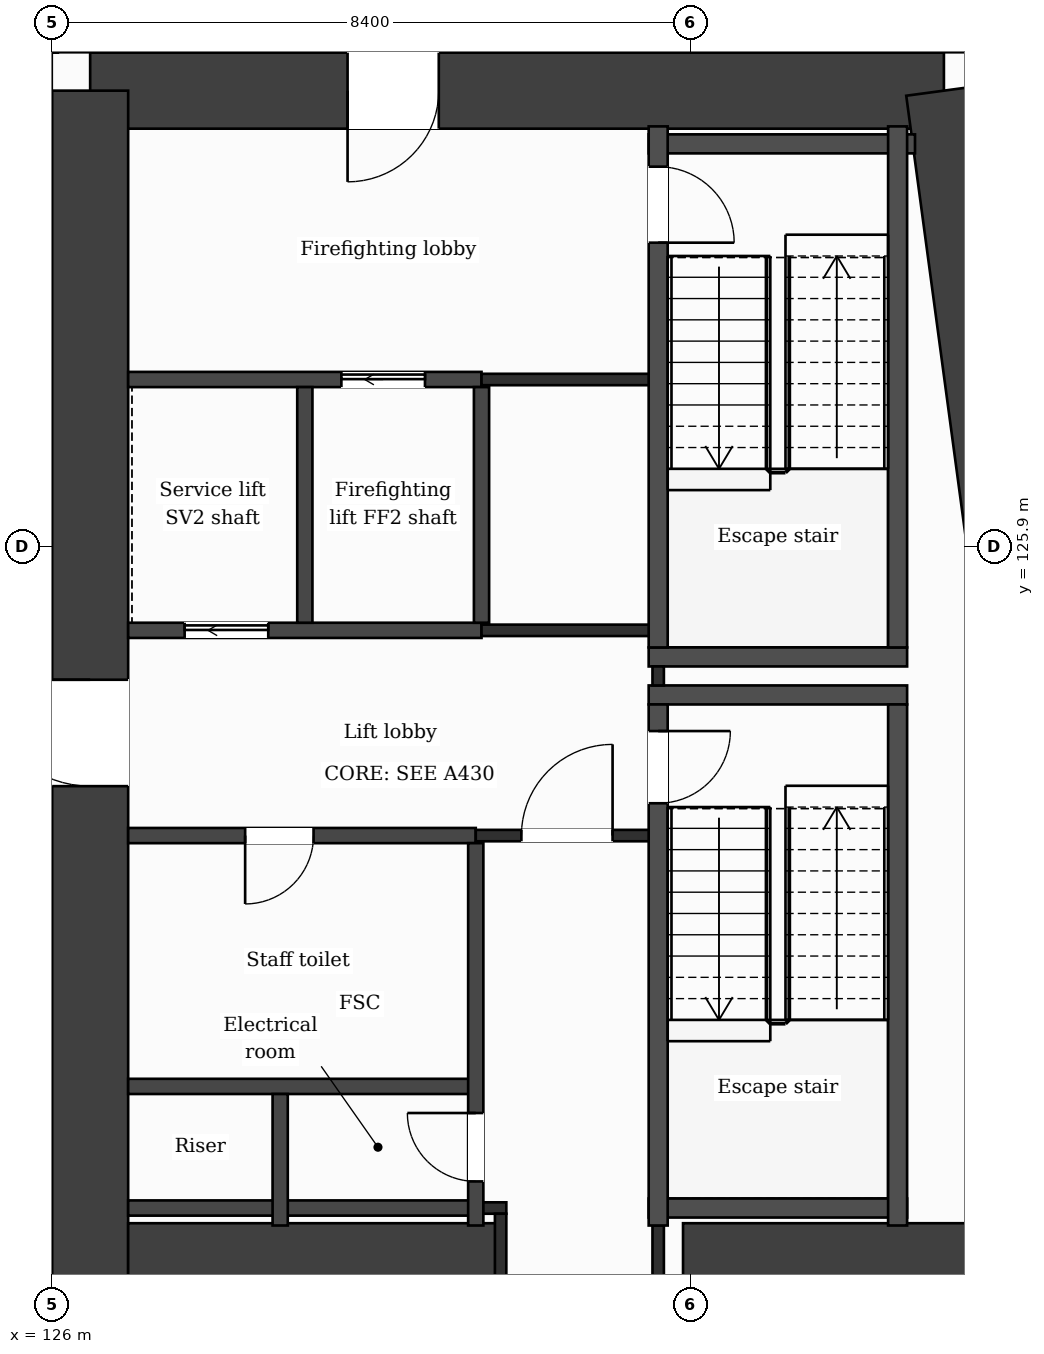
"""IFC4 building model, lengths in metres.
Left out: names, types, materials, properties, quantities, classifications, styles, units other than length and angle.
Written with IfcOpenShell. Run it as: python <this file> out.ifc"""

import sys

from ifc_helpers import new_model, si_unit, direction, frame, frame_2d, origin, place, context, subcontext, project, spatial, rectangle, extrude, element, fill, save


model = new_model("IFC4")
c1 = context("Model", 3, precision=1e-05, world=origin(), true_north=direction((0.0, 1.0)))
c2 = subcontext(c1, "Body", "Model", "MODEL_VIEW")
j1 = project(units=[si_unit("LENGTHUNIT", "METRE"), si_unit("PLANEANGLEUNIT", "RADIAN")], contexts=[c1])
p1 = place(None, origin())
s1 = spatial("IfcSite", under=j1, at=p1, CompositionType="ELEMENT")
p2 = place(p1, origin())
s2 = spatial("IfcBuilding", under=s1, at=p2, CompositionType="ELEMENT")
p3 = place(p2, frame((0.0, 0.0, 124.3)))
s3 = spatial("IfcBuildingStorey", under=s2, at=p3, CompositionType="ELEMENT", Elevation=124.3)
p4 = place(p3, frame((126.5, 131.9, 0.0), z_axis=(0.0, 0.0, 1.0), x_axis=(1.0, 0.0, 0.0)))
e1 = element("IfcWall", 1, at=p4, inside=s3, PredefinedType="SHEAR", context=c2, shape_type="SweptSolid", body=[
    extrude(rectangle(XDim=11.232, YDim=1.0, at=frame_2d((5.616, 0.0))), origin(), (0.0, 0.0, 1.0), 3.7),
])
p5 = place(p4, frame((3.386, 0.0, 0.0)))
e2 = element("IfcOpeningElement", 2, at=p5, cuts=e1, PredefinedType="OPENING", context=c2, shape_type="SweptSolid", body=[
    extrude(rectangle(XDim=1.2, YDim=2.1, at=frame_2d((0.6, 1.05))), frame((0.0, 0.51, 0.0), z_axis=(0.0, -1.0, 0.0), x_axis=(1.0, 0.0, 0.0)), (0.0, 0.0, 1.0), 1.02),
])
p6 = place(p3, frame((137.732, 131.9, 0.0), z_axis=(0.0, 0.0, 1.0), x_axis=(0.133411141623, -0.991060778808, 0.0)))
e3 = element("IfcWall", 3, at=p6, inside=s3, PredefinedType="SHEAR", context=c2, shape_type="SweptSolid", body=[
    extrude(rectangle(XDim=21.189, YDim=1.0, at=frame_2d((10.595, 0.0))), origin(), (0.0, 0.0, 1.0), 3.7),
])
p7 = place(p3, frame((126.5, 110.9, 0.0), z_axis=(0.0, 0.0, 1.0), x_axis=(0.0, 1.0, 0.0)))
e4 = element("IfcWall", 4, at=p7, inside=s3, PredefinedType="SHEAR", context=c2, shape_type="SweptSolid", body=[
    extrude(rectangle(XDim=21.0, YDim=1.0, at=frame_2d((10.5, 0.0))), origin(), (0.0, 0.0, 1.0), 3.7),
])
p8 = place(p7, frame((11.85, 0.0, 0.0)))
e5 = element("IfcOpeningElement", 5, at=p8, cuts=e4, PredefinedType="OPENING", context=c2, shape_type="SweptSolid", body=[
    extrude(rectangle(XDim=1.4, YDim=2.1, at=frame_2d((0.7, 1.05))), frame((0.0, 0.51, 0.0), z_axis=(0.0, -1.0, 0.0), x_axis=(1.0, 0.0, 0.0)), (0.0, 0.0, 1.0), 1.02),
])
p9 = place(p3, frame((127.0, 116.5, 0.0), z_axis=(0.0, 0.0, 1.0), x_axis=(1.0, 0.0, 0.0)))
e6 = element("IfcWall", 6, at=p9, inside=s3, PredefinedType="SHEAR", context=c2, shape_type="SweptSolid", body=[
    extrude(rectangle(XDim=4.9, YDim=1.0, at=frame_2d((2.45, 0.0))), origin(), (0.0, 0.0, 1.0), 3.7),
])
p10 = place(p3, frame((134.3, 116.5, 0.0), z_axis=(0.0, 0.0, 1.0), x_axis=(1.0, 0.0, 0.0)))
e7 = element("IfcWall", 7, at=p10, inside=s3, PredefinedType="SHEAR", context=c2, shape_type="SweptSolid", body=[
    extrude(rectangle(XDim=5.077, YDim=1.0, at=frame_2d((2.539, 0.0))), origin(), (0.0, 0.0, 1.0), 3.7),
])
p11 = place(p3, frame((136.504, 132.4, 0.0), z_axis=(0.0, 0.0, 1.0), x_axis=(-0.133399697462, 0.99106231929, 0.0)))
e8 = element("IfcWall", 8, at=p11, inside=s3, PredefinedType="SOLIDWALL", context=c2, shape_type="SweptSolid", body=[
    extrude(rectangle(XDim=6.74, YDim=0.3, at=frame_2d((3.37, 0.0))), origin(), (0.0, 0.0, 1.0), 3.38),
])
p12 = place(p11, frame((1.115, 0.0, 0.0)))
e9 = element("IfcOpeningElement", 9, at=p12, cuts=e8, PredefinedType="OPENING", context=c2, shape_type="SweptSolid", body=[
    extrude(rectangle(XDim=1.2, YDim=2.4, at=frame_2d((0.6, 1.2))), frame((0.0, 0.16, 0.0), z_axis=(0.0, -1.0, 0.0), x_axis=(1.0, 0.0, 0.0)), (0.0, 0.0, 1.0), 0.32),
])
p13 = place(p11, frame((4.436, 0.0, 0.9)))
e10 = element("IfcOpeningElement", 10, at=p13, cuts=e8, PredefinedType="OPENING", context=c2, shape_type="SweptSolid", body=[
    extrude(rectangle(XDim=1.2, YDim=2.1, at=frame_2d((0.6, 1.05))), frame((0.0, 0.16, 0.0), z_axis=(0.0, -1.0, 0.0), x_axis=(1.0, 0.0, 0.0)), (0.0, 0.0, 1.0), 0.32),
])
p14 = place(p3, frame((127.0, 117.2, 0.0), z_axis=(0.0, 0.0, 1.0), x_axis=(1.0, 0.0, 0.0)))
e11 = element("IfcWall", 11, at=p14, inside=s3, PredefinedType="PARTITIONING", context=c2, shape_type="SweptSolid", body=[
    extrude(rectangle(XDim=4.573, YDim=0.2, at=frame_2d((2.287, 0.0))), origin(), (0.0, 0.0, 1.0), 3.38),
])
p15 = place(p3, frame((131.573, 117.2, 0.0), z_axis=(0.0, 0.0, 1.0), x_axis=(1.0, 0.0, 0.0)))
e12 = element("IfcWall", 12, at=p15, inside=s3, PredefinedType="PARTITIONING", context=c2, shape_type="SweptSolid", body=[
    extrude(rectangle(XDim=0.402, YDim=0.15, at=frame_2d((0.201, 0.0))), origin(), (0.0, 0.0, 1.0), 3.38),
])
p16 = place(p3, frame((133.848, 117.2, 0.0), z_axis=(0.0, 0.0, 1.0), x_axis=(1.0, 0.0, 0.0)))
e13 = element("IfcWall", 13, at=p16, inside=s3, PredefinedType="PARTITIONING", context=c2, shape_type="SweptSolid", body=[
    extrude(rectangle(XDim=3.4, YDim=0.25, at=frame_2d((1.7, 0.0))), origin(), (0.0, 0.0, 1.0), 3.38),
])
p17 = place(p3, frame((127.0, 118.8, 0.0), z_axis=(0.0, 0.0, 1.0), x_axis=(1.0, 0.0, 0.0)))
e14 = element("IfcWall", 14, at=p17, inside=s3, PredefinedType="PARTITIONING", context=c2, shape_type="SweptSolid", body=[
    extrude(rectangle(XDim=4.573, YDim=0.2, at=frame_2d((2.287, 0.0))), origin(), (0.0, 0.0, 1.0), 3.38),
])
p18 = place(p3, frame((127.0, 122.1, 0.0), z_axis=(0.0, 0.0, 1.0), x_axis=(1.0, 0.0, 0.0)))
e15 = element("IfcWall", 15, at=p18, inside=s3, PredefinedType="PARTITIONING", context=c2, shape_type="SweptSolid", body=[
    extrude(rectangle(XDim=4.573, YDim=0.2, at=frame_2d((2.287, 0.0))), origin(), (0.0, 0.0, 1.0), 3.38),
])
p19 = place(p18, frame((1.539, 0.0, 0.0)))
e16 = element("IfcOpeningElement", 16, at=p19, cuts=e15, PredefinedType="OPENING", context=c2, shape_type="SweptSolid", body=[
    extrude(rectangle(XDim=0.9, YDim=2.1, at=frame_2d((0.45, 1.05))), frame((0.0, 0.11, 0.0), z_axis=(0.0, -1.0, 0.0), x_axis=(1.0, 0.0, 0.0)), (0.0, 0.0, 1.0), 0.22),
])
p20 = place(p3, frame((131.573, 122.1, 0.0), z_axis=(0.0, 0.0, 1.0), x_axis=(1.0, 0.0, 0.0)))
e17 = element("IfcWall", 17, at=p20, inside=s3, PredefinedType="PARTITIONING", context=c2, shape_type="SweptSolid", body=[
    extrude(rectangle(XDim=2.4, YDim=0.15, at=frame_2d((1.2, 0.0))), origin(), (0.0, 0.0, 1.0), 3.38),
])
p21 = place(p20, frame((0.6, 0.0, 0.0)))
e18 = element("IfcOpeningElement", 18, at=p21, cuts=e17, PredefinedType="OPENING", context=c2, shape_type="SweptSolid", body=[
    extrude(rectangle(XDim=1.2, YDim=2.1, at=frame_2d((0.6, 1.05))), frame((0.0, 0.085, 0.0), z_axis=(0.0, -1.0, 0.0), x_axis=(1.0, 0.0, 0.0)), (0.0, 0.0, 1.0), 0.17),
])
p22 = place(p3, frame((100.8, 122.45, 0.0), z_axis=(0.0, 0.0, 1.0), x_axis=(1.0, 0.0, 0.0)))
e19 = element("IfcWall", 19, at=p22, inside=s3, PredefinedType="PARTITIONING", context=c2, shape_type="SweptSolid", body=[
    extrude(rectangle(XDim=25.2, YDim=0.15, at=frame_2d((12.6, 0.0))), origin(), (0.0, 0.0, 1.0), 3.38),
])
for number, where, z_axis, x_axis in (
    (20, (133.848, 123.95, 0.0), (0.0, 0.0, 1.0), (1.0, 0.0, 0.0)),
    (21, (133.848, 124.45, 0.0), (0.0, 0.0, 1.0), (1.0, 0.0, 0.0)),
):
    element("IfcWall", number, at=place(p3, frame(where, z_axis=z_axis, x_axis=x_axis)), inside=s3, PredefinedType="PARTITIONING", context=c2, shape_type="SweptSolid", body=[
        extrude(rectangle(XDim=3.4, YDim=0.25, at=frame_2d((1.7, 0.0))), origin(), (0.0, 0.0, 1.0), 3.38),
    ])
p23 = place(p3, frame((100.8, 124.45, 0.0), z_axis=(0.0, 0.0, 1.0), x_axis=(1.0, 0.0, 0.0)))
e22 = element("IfcWall", 22, at=p23, inside=s3, PredefinedType="PARTITIONING", context=c2, shape_type="SweptSolid", body=[
    extrude(rectangle(XDim=25.2, YDim=0.15, at=frame_2d((12.6, 0.0))), origin(), (0.0, 0.0, 1.0), 3.38),
])
p24 = place(p23, frame((1.85, 0.0, 0.0)))
e23 = element("IfcOpeningElement", 23, at=p24, cuts=e22, PredefinedType="OPENING", context=c2, shape_type="SweptSolid", body=[
    extrude(rectangle(XDim=1.0, YDim=2.1, at=frame_2d((0.5, 1.05))), frame((0.0, 0.085, 0.0), z_axis=(0.0, -1.0, 0.0), x_axis=(1.0, 0.0, 0.0)), (0.0, 0.0, 1.0), 0.17),
])
p25 = place(p23, frame((6.425, 0.0, 0.0)))
e24 = element("IfcOpeningElement", 24, at=p25, cuts=e22, PredefinedType="OPENING", context=c2, shape_type="SweptSolid", body=[
    extrude(rectangle(XDim=1.0, YDim=2.1, at=frame_2d((0.5, 1.05))), frame((0.0, 0.085, 0.0), z_axis=(0.0, -1.0, 0.0), x_axis=(1.0, 0.0, 0.0)), (0.0, 0.0, 1.0), 0.17),
])
p26 = place(p23, frame((12.77, 0.0, 0.0)))
e25 = element("IfcOpeningElement", 25, at=p26, cuts=e22, PredefinedType="OPENING", context=c2, shape_type="SweptSolid", body=[
    extrude(rectangle(XDim=1.0, YDim=2.1, at=frame_2d((0.5, 1.05))), frame((0.0, 0.085, 0.0), z_axis=(0.0, -1.0, 0.0), x_axis=(1.0, 0.0, 0.0)), (0.0, 0.0, 1.0), 0.17),
])
p27 = place(p23, frame((17.8, 0.0, 0.0)))
e26 = element("IfcOpeningElement", 26, at=p27, cuts=e22, PredefinedType="OPENING", context=c2, shape_type="SweptSolid", body=[
    extrude(rectangle(XDim=1.0, YDim=2.1, at=frame_2d((0.5, 1.05))), frame((0.0, 0.085, 0.0), z_axis=(0.0, -1.0, 0.0), x_axis=(1.0, 0.0, 0.0)), (0.0, 0.0, 1.0), 0.17),
])
p28 = place(p23, frame((22.85, 0.0, 0.0)))
e27 = element("IfcOpeningElement", 27, at=p28, cuts=e22, PredefinedType="OPENING", context=c2, shape_type="SweptSolid", body=[
    extrude(rectangle(XDim=1.0, YDim=2.1, at=frame_2d((0.5, 1.05))), frame((0.0, 0.085, 0.0), z_axis=(0.0, -1.0, 0.0), x_axis=(1.0, 0.0, 0.0)), (0.0, 0.0, 1.0), 0.17),
])
p29 = place(p3, frame((127.0, 124.8, 0.0), z_axis=(0.0, 0.0, 1.0), x_axis=(1.0, 0.0, 0.0)))
e28 = element("IfcWall", 28, at=p29, inside=s3, PredefinedType="PARTITIONING", context=c2, shape_type="SweptSolid", body=[
    extrude(rectangle(XDim=4.649, YDim=0.2, at=frame_2d((2.324, 0.0))), origin(), (0.0, 0.0, 1.0), 3.38),
])
p30 = place(p29, frame((0.743, 0.0, 0.0)))
e29 = element("IfcOpeningElement", 29, at=p30, cuts=e28, PredefinedType="OPENING", context=c2, shape_type="SweptSolid", body=[
    extrude(rectangle(XDim=1.1, YDim=2.1, at=frame_2d((0.55, 1.05))), frame((0.0, 0.11, 0.0), z_axis=(0.0, -1.0, 0.0), x_axis=(1.0, 0.0, 0.0)), (0.0, 0.0, 1.0), 0.22),
])
p31 = place(p3, frame((131.649, 124.8, 0.0), z_axis=(0.0, 0.0, 1.0), x_axis=(1.0, 0.0, 0.0)))
e30 = element("IfcWall", 30, at=p31, inside=s3, PredefinedType="PARTITIONING", context=c2, shape_type="SweptSolid", body=[
    extrude(rectangle(XDim=2.449, YDim=0.15, at=frame_2d((1.225, 0.0))), origin(), (0.0, 0.0, 1.0), 3.38),
])
p32 = place(p3, frame((127.0, 128.1, 0.0), z_axis=(0.0, 0.0, 1.0), x_axis=(1.0, 0.0, 0.0)))
e31 = element("IfcWall", 31, at=p32, inside=s3, PredefinedType="PARTITIONING", context=c2, shape_type="SweptSolid", body=[
    extrude(rectangle(XDim=4.649, YDim=0.2, at=frame_2d((2.324, 0.0))), origin(), (0.0, 0.0, 1.0), 3.38),
])
p33 = place(p32, frame((2.805, 0.0, 0.0)))
e32 = element("IfcOpeningElement", 32, at=p33, cuts=e31, PredefinedType="OPENING", context=c2, shape_type="SweptSolid", body=[
    extrude(rectangle(XDim=1.1, YDim=2.1, at=frame_2d((0.55, 1.05))), frame((0.0, 0.11, 0.0), z_axis=(0.0, -1.0, 0.0), x_axis=(1.0, 0.0, 0.0)), (0.0, 0.0, 1.0), 0.22),
])
p34 = place(p3, frame((131.649, 128.1, 0.0), z_axis=(0.0, 0.0, 1.0), x_axis=(1.0, 0.0, 0.0)))
e33 = element("IfcWall", 33, at=p34, inside=s3, PredefinedType="PARTITIONING", context=c2, shape_type="SweptSolid", body=[
    extrude(rectangle(XDim=2.324, YDim=0.15, at=frame_2d((1.162, 0.0))), origin(), (0.0, 0.0, 1.0), 3.38),
])
p35 = place(p3, frame((133.848, 131.2, 0.0), z_axis=(0.0, 0.0, 1.0), x_axis=(1.0, 0.0, 0.0)))
e34 = element("IfcWall", 34, at=p35, inside=s3, PredefinedType="PARTITIONING", context=c2, shape_type="SweptSolid", body=[
    extrude(rectangle(XDim=3.504, YDim=0.25, at=frame_2d((1.752, 0.0))), origin(), (0.0, 0.0, 1.0), 3.38),
])
p36 = place(p3, frame((129.0, 116.97, 0.0), z_axis=(0.0, 0.0, 1.0), x_axis=(0.0, 1.0, 0.0)))
e35 = element("IfcWall", 35, at=p36, inside=s3, PredefinedType="PARTITIONING", context=c2, shape_type="SweptSolid", body=[
    extrude(rectangle(XDim=1.73, YDim=0.2, at=frame_2d((0.865, 0.0))), origin(), (0.0, 0.0, 1.0), 3.38),
])
p37 = place(p3, frame((129.324, 124.9, 0.0), z_axis=(0.0, 0.0, 1.0), x_axis=(0.0, 1.0, 0.0)))
e36 = element("IfcWall", 36, at=p37, inside=s3, PredefinedType="PARTITIONING", context=c2, shape_type="SweptSolid", body=[
    extrude(rectangle(XDim=3.1, YDim=0.2, at=frame_2d((1.55, 0.0))), origin(), (0.0, 0.0, 1.0), 3.38),
])
p38 = place(p3, frame((131.573, 116.97, 0.0), z_axis=(0.0, 0.0, 1.0), x_axis=(0.0, 1.0, 0.0)))
e37 = element("IfcWall", 37, at=p38, inside=s3, PredefinedType="PARTITIONING", context=c2, shape_type="SweptSolid", body=[
    extrude(rectangle(XDim=5.03, YDim=0.2, at=frame_2d((2.515, 0.0))), origin(), (0.0, 0.0, 1.0), 3.38),
])
p39 = place(p38, frame((0.58, 0.0, 0.0)))
e38 = element("IfcOpeningElement", 38, at=p39, cuts=e37, PredefinedType="OPENING", context=c2, shape_type="SweptSolid", body=[
    extrude(rectangle(XDim=0.9, YDim=2.1, at=frame_2d((0.45, 1.05))), frame((0.0, 0.11, 0.0), z_axis=(0.0, -1.0, 0.0), x_axis=(1.0, 0.0, 0.0)), (0.0, 0.0, 1.0), 0.22),
])
p40 = place(p3, frame((131.649, 124.9, 0.0), z_axis=(0.0, 0.0, 1.0), x_axis=(0.0, 1.0, 0.0)))
e39 = element("IfcWall", 39, at=p40, inside=s3, PredefinedType="PARTITIONING", context=c2, shape_type="SweptSolid", body=[
    extrude(rectangle(XDim=3.1, YDim=0.2, at=frame_2d((1.55, 0.0))), origin(), (0.0, 0.0, 1.0), 3.38),
])
p41 = place(p3, frame((131.9, 116.0, 0.0), z_axis=(0.0, 0.0, 1.0), x_axis=(0.0, 1.0, 0.0)))
e40 = element("IfcWall", 40, at=p41, inside=s3, PredefinedType="PARTITIONING", context=c2, shape_type="SweptSolid", body=[
    extrude(rectangle(XDim=1.125, YDim=0.15, at=frame_2d((0.562, 0.0))), origin(), (0.0, 0.0, 1.0), 3.38),
])
p42 = place(p3, frame((133.973, 116.0, 0.0), z_axis=(0.0, 0.0, 1.0), x_axis=(0.0, 1.0, 0.0)))
e41 = element("IfcWall", 41, at=p42, inside=s3, PredefinedType="PARTITIONING", context=c2, shape_type="SweptSolid", body=[
    extrude(rectangle(XDim=0.97, YDim=0.15, at=frame_2d((0.485, 0.0))), origin(), (0.0, 0.0, 1.0), 3.38),
])
p43 = place(p3, frame((133.973, 124.075, 0.0), z_axis=(0.0, 0.0, 1.0), x_axis=(0.0, 1.0, 0.0)))
e42 = element("IfcWall", 42, at=p43, inside=s3, PredefinedType="PARTITIONING", context=c2, shape_type="SweptSolid", body=[
    extrude(rectangle(XDim=0.25, YDim=0.15, at=frame_2d((0.125, 0.0))), origin(), (0.0, 0.0, 1.0), 3.38),
])
p44 = place(p3, frame((133.973, 116.97, 0.0), z_axis=(0.0, 0.0, 1.0), x_axis=(0.0, 1.0, 0.0)))
e43 = element("IfcWall", 43, at=p44, inside=s3, PredefinedType="PARTITIONING", context=c2, shape_type="SweptSolid", body=[
    extrude(rectangle(XDim=6.855, YDim=0.25, at=frame_2d((3.427, 0.0))), origin(), (0.0, 0.0, 1.0), 3.38),
])
p45 = place(p44, frame((5.555, 0.0, 0.0)))
e44 = element("IfcOpeningElement", 44, at=p45, cuts=e43, PredefinedType="OPENING", context=c2, shape_type="SweptSolid", body=[
    extrude(rectangle(XDim=0.95, YDim=2.1, at=frame_2d((0.475, 1.05))), frame((0.0, 0.135, 0.0), z_axis=(0.0, -1.0, 0.0), x_axis=(1.0, 0.0, 0.0)), (0.0, 0.0, 1.0), 0.27),
])
p46 = place(p3, frame((133.973, 124.575, 0.0), z_axis=(0.0, 0.0, 1.0), x_axis=(0.0, 1.0, 0.0)))
e45 = element("IfcWall", 45, at=p46, inside=s3, PredefinedType="PARTITIONING", context=c2, shape_type="SweptSolid", body=[
    extrude(rectangle(XDim=6.855, YDim=0.25, at=frame_2d((3.427, 0.0))), origin(), (0.0, 0.0, 1.0), 3.38),
])
p47 = place(p46, frame((5.325, 0.0, 0.0)))
e46 = element("IfcOpeningElement", 46, at=p47, cuts=e45, PredefinedType="OPENING", context=c2, shape_type="SweptSolid", body=[
    extrude(rectangle(XDim=1.0, YDim=2.1, at=frame_2d((0.5, 1.05))), frame((0.0, 0.135, 0.0), z_axis=(0.0, -1.0, 0.0), x_axis=(1.0, 0.0, 0.0)), (0.0, 0.0, 1.0), 0.27),
])
for number, where, z_axis, x_axis in (
    (47, (137.123, 116.97, 0.0), (0.0, 0.0, 1.0), (0.0, 1.0, 0.0)),
    (48, (137.123, 124.575, 0.0), (0.0, 0.0, 1.0), (0.0, 1.0, 0.0)),
):
    element("IfcWall", number, at=place(p3, frame(where, z_axis=z_axis, x_axis=x_axis)), inside=s3, PredefinedType="PARTITIONING", context=c2, shape_type="SweptSolid", body=[
        extrude(rectangle(XDim=6.855, YDim=0.25, at=frame_2d((3.427, 0.0))), origin(), (0.0, 0.0, 1.0), 3.38),
    ])
p48 = place(p21, origin())
e49 = element("IfcDoor", 49, at=p48, inside=s3, OperationType="SINGLE_SWING_RIGHT", PredefinedType="DOOR", context=c2, shape_type="SweptSolid", body=[
    extrude(rectangle(XDim=1.2, YDim=2.1, at=frame_2d((0.6, 1.05))), frame((0.0, 0.025, 0.0), z_axis=(0.0, -1.0, 0.0), x_axis=(1.0, 0.0, 0.0)), (0.0, 0.0, 1.0), 0.05),
])
fill(e18, e49)
p49 = place(p33, origin())
e50 = element("IfcDoor", 50, at=p49, inside=s3, OperationType="SLIDING_TO_LEFT", PredefinedType="DOOR", context=c2, shape_type="SweptSolid", body=[
    extrude(rectangle(XDim=1.1, YDim=2.1, at=frame_2d((0.55, 1.05))), frame((0.0, 0.025, 0.0), z_axis=(0.0, -1.0, 0.0), x_axis=(1.0, 0.0, 0.0)), (0.0, 0.0, 1.0), 0.05),
])
fill(e32, e50)
p50 = place(p30, origin())
e51 = element("IfcDoor", 51, at=p50, inside=s3, OperationType="SLIDING_TO_LEFT", PredefinedType="DOOR", context=c2, shape_type="SweptSolid", body=[
    extrude(rectangle(XDim=1.1, YDim=2.1, at=frame_2d((0.55, 1.05))), frame((0.0, 0.025, 0.0), z_axis=(0.0, -1.0, 0.0), x_axis=(1.0, 0.0, 0.0)), (0.0, 0.0, 1.0), 0.05),
])
fill(e29, e51)
p51 = place(p19, origin())
e52 = element("IfcDoor", 52, at=p51, inside=s3, OperationType="SINGLE_SWING_LEFT", PredefinedType="DOOR", context=c2, shape_type="SweptSolid", body=[
    extrude(rectangle(XDim=0.9, YDim=2.1, at=frame_2d((0.45, 1.05))), frame((0.0, 0.025, 0.0), z_axis=(0.0, -1.0, 0.0), x_axis=(1.0, 0.0, 0.0)), (0.0, 0.0, 1.0), 0.05),
])
fill(e16, e52)
p52 = place(p45, origin())
e53 = element("IfcDoor", 53, at=p52, inside=s3, OperationType="SINGLE_SWING_RIGHT", PredefinedType="DOOR", context=c2, shape_type="SweptSolid", body=[
    extrude(rectangle(XDim=0.95, YDim=2.1, at=frame_2d((0.475, 1.05))), frame((0.0, 0.025, 0.0), z_axis=(0.0, -1.0, 0.0), x_axis=(1.0, 0.0, 0.0)), (0.0, 0.0, 1.0), 0.05),
])
fill(e44, e53)
p53 = place(p47, origin())
e54 = element("IfcDoor", 54, at=p53, inside=s3, OperationType="SINGLE_SWING_LEFT", PredefinedType="DOOR", context=c2, shape_type="SweptSolid", body=[
    extrude(rectangle(XDim=1.0, YDim=2.1, at=frame_2d((0.5, 1.05))), frame((0.0, 0.025, 0.0), z_axis=(0.0, -1.0, 0.0), x_axis=(1.0, 0.0, 0.0)), (0.0, 0.0, 1.0), 0.05),
])
fill(e46, e54)
p54 = place(p39, origin())
e55 = element("IfcDoor", 55, at=p54, inside=s3, OperationType="SINGLE_SWING_RIGHT", PredefinedType="DOOR", context=c2, shape_type="SweptSolid", body=[
    extrude(rectangle(XDim=0.9, YDim=2.1, at=frame_2d((0.45, 1.05))), frame((0.0, 0.025, 0.0), z_axis=(0.0, -1.0, 0.0), x_axis=(1.0, 0.0, 0.0)), (0.0, 0.0, 1.0), 0.05),
])
fill(e38, e55)
p55 = place(p5, origin())
e56 = element("IfcDoor", 56, at=p55, inside=s3, OperationType="SINGLE_SWING_LEFT", PredefinedType="DOOR", context=c2, shape_type="SweptSolid", body=[
    extrude(rectangle(XDim=1.2, YDim=2.1, at=frame_2d((0.6, 1.05))), frame((0.0, 0.025, 0.0), z_axis=(0.0, -1.0, 0.0), x_axis=(1.0, 0.0, 0.0)), (0.0, 0.0, 1.0), 0.05),
])
fill(e2, e56)
p56 = place(p8, origin())
e57 = element("IfcDoor", 57, at=p56, inside=s3, OperationType="SINGLE_SWING_RIGHT", PredefinedType="DOOR", context=c2, shape_type="SweptSolid", body=[
    extrude(rectangle(XDim=1.4, YDim=2.1, at=frame_2d((0.7, 1.05))), frame((0.0, 0.025, 0.0), z_axis=(0.0, -1.0, 0.0), x_axis=(1.0, 0.0, 0.0)), (0.0, 0.0, 1.0), 0.05),
])
fill(e5, e57)
save(model, sys.argv[1])
